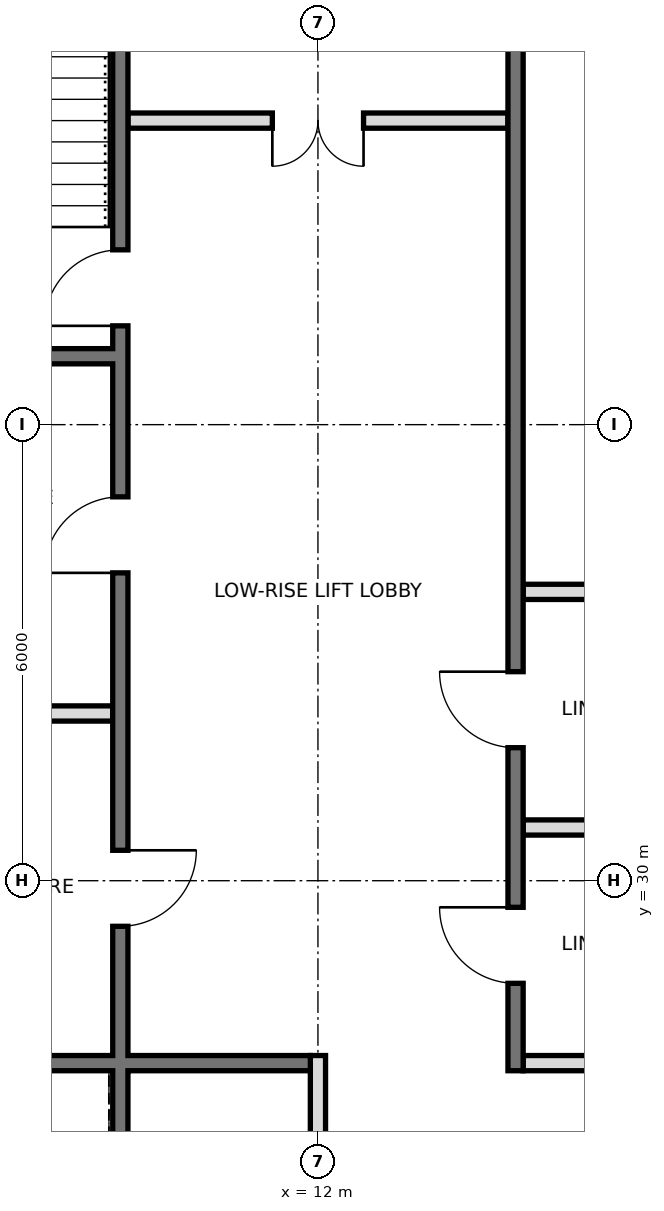
"""IFC4 building model, lengths in metres.
Left out: names, types, materials, properties, quantities, classifications, styles, units other than length and angle.
Written with IfcOpenShell. Run it as: python <this file> out.ifc"""

import sys

from ifc_helpers import new_model, si_unit, direction, frame, frame_2d, origin, place, context, subcontext, project, spatial, rectangle, extrude, element, fill, save


model = new_model("IFC4")
c1 = context("Model", 3, precision=1e-05, world=origin(), true_north=direction((0.0, 1.0)))
c2 = subcontext(c1, "Body", "Model", "MODEL_VIEW")
j1 = project(units=[si_unit("LENGTHUNIT", "METRE"), si_unit("PLANEANGLEUNIT", "RADIAN")], contexts=[c1])
p1 = place(None, origin())
s1 = spatial("IfcSite", under=j1, at=p1, CompositionType="ELEMENT")
p2 = place(p1, origin())
s2 = spatial("IfcBuilding", under=s1, at=p2, CompositionType="ELEMENT")
p3 = place(p2, frame((0.0, 0.0, 349.8)))
s3 = spatial("IfcBuildingStorey", under=s2, at=p3, CompositionType="ELEMENT", Elevation=349.8)
p4 = place(p3, frame((12.0, 21.5, 0.0), z_axis=(0.0, 0.0, 1.0), x_axis=(0.0, 1.0, 0.0)))
e1 = element("IfcWall", 1, at=p4, inside=s3, PredefinedType="PARTITIONING", context=c2, shape_type="SweptSolid", body=[
    extrude(rectangle(XDim=6.2, YDim=0.2, at=frame_2d((3.1, 0.0))), origin(), (0.0, 0.0, 1.0), 3.75),
])
p5 = place(p3, frame((14.6, 27.5, 0.0), z_axis=(0.0, 0.0, 1.0), x_axis=(0.0, 1.0, 0.0)))
e2 = element("IfcWall", 2, at=p5, inside=s3, PredefinedType="SOLIDWALL", context=c2, shape_type="SweptSolid", body=[
    extrude(rectangle(XDim=17.5, YDim=0.2, at=frame_2d((8.75, 0.0))), origin(), (0.0, 0.0, 1.0), 3.75),
])
p6 = place(p5, frame((15.4, 0.0, 0.0)))
e3 = element("IfcOpeningElement", 3, at=p6, cuts=e2, PredefinedType="OPENING", context=c2, shape_type="SweptSolid", body=[
    extrude(rectangle(XDim=1.1, YDim=2.1, at=frame_2d((0.55, 1.05))), frame((0.0, 0.11, 0.0), z_axis=(0.0, -1.0, 0.0), x_axis=(1.0, 0.0, 0.0)), (0.0, 0.0, 1.0), 0.22),
])
p7 = place(p5, frame((1.15, 0.0, 0.0)))
e4 = element("IfcOpeningElement", 4, at=p7, cuts=e2, PredefinedType="OPENING", context=c2, shape_type="SweptSolid", body=[
    extrude(rectangle(XDim=1.0, YDim=2.1, at=frame_2d((0.5, 1.05))), frame((0.0, 0.11, 0.0), z_axis=(0.0, -1.0, 0.0), x_axis=(1.0, 0.0, 0.0)), (0.0, 0.0, 1.0), 0.22),
])
p8 = place(p5, frame((4.25, 0.0, 0.0)))
e5 = element("IfcOpeningElement", 5, at=p8, cuts=e2, PredefinedType="OPENING", context=c2, shape_type="SweptSolid", body=[
    extrude(rectangle(XDim=1.0, YDim=2.1, at=frame_2d((0.5, 1.05))), frame((0.0, 0.11, 0.0), z_axis=(0.0, -1.0, 0.0), x_axis=(1.0, 0.0, 0.0)), (0.0, 0.0, 1.0), 0.22),
])
p9 = place(p3, frame((9.4, 21.5, 0.0), z_axis=(0.0, 0.0, 1.0), x_axis=(0.0, 1.0, 0.0)))
e6 = element("IfcWall", 6, at=p9, inside=s3, PredefinedType="SOLIDWALL", context=c2, shape_type="SweptSolid", body=[
    extrude(rectangle(XDim=23.5, YDim=0.2, at=frame_2d((11.75, 0.0))), origin(), (0.0, 0.0, 1.0), 3.75),
])
p10 = place(p9, frame((7.9, 0.0, 0.0)))
e7 = element("IfcOpeningElement", 7, at=p10, cuts=e6, PredefinedType="OPENING", context=c2, shape_type="SweptSolid", body=[
    extrude(rectangle(XDim=1.0, YDim=2.1, at=frame_2d((0.5, 1.05))), frame((0.0, 0.11, 0.0), z_axis=(0.0, -1.0, 0.0), x_axis=(1.0, 0.0, 0.0)), (0.0, 0.0, 1.0), 0.22),
])
p11 = place(p9, frame((12.55, 0.0, 0.0)))
e8 = element("IfcOpeningElement", 8, at=p11, cuts=e6, PredefinedType="OPENING", context=c2, shape_type="SweptSolid", body=[
    extrude(rectangle(XDim=1.0, YDim=2.1, at=frame_2d((0.5, 1.05))), frame((0.0, 0.11, 0.0), z_axis=(0.0, -1.0, 0.0), x_axis=(1.0, 0.0, 0.0)), (0.0, 0.0, 1.0), 0.22),
])
p12 = place(p9, frame((15.8, 0.0, 0.0)))
e9 = element("IfcOpeningElement", 9, at=p12, cuts=e6, PredefinedType="OPENING", context=c2, shape_type="SweptSolid", body=[
    extrude(rectangle(XDim=1.0, YDim=2.1, at=frame_2d((0.5, 1.05))), frame((0.0, 0.11, 0.0), z_axis=(0.0, -1.0, 0.0), x_axis=(1.0, 0.0, 0.0)), (0.0, 0.0, 1.0), 0.22),
])
p13 = place(p9, frame((0.275, 0.0, 0.0)))
e10 = element("IfcOpeningElement", 10, at=p13, cuts=e6, PredefinedType="OPENING", context=c2, shape_type="SweptSolid", body=[
    extrude(rectangle(XDim=0.9, YDim=2.1, at=frame_2d((0.45, 1.05))), frame((0.0, 0.11, 0.0), z_axis=(0.0, -1.0, 0.0), x_axis=(1.0, 0.0, 0.0)), (0.0, 0.0, 1.0), 0.22),
])
p14 = place(p3, frame((14.7, 27.6, 0.0), z_axis=(0.0, 0.0, 1.0), x_axis=(1.0, 0.0, 0.0)))
e11 = element("IfcWall", 11, at=p14, inside=s3, PredefinedType="PARTITIONING", context=c2, shape_type="SweptSolid", body=[
    extrude(rectangle(XDim=2.7, YDim=0.2, at=frame_2d((1.35, 0.0))), origin(), (0.0, 0.0, 1.0), 3.75),
])
p15 = place(p3, frame((6.6, 27.6, 0.0), z_axis=(0.0, 0.0, 1.0), x_axis=(1.0, 0.0, 0.0)))
e12 = element("IfcWall", 12, at=p15, inside=s3, PredefinedType="SOLIDWALL", context=c2, shape_type="SweptSolid", body=[
    extrude(rectangle(XDim=5.3, YDim=0.2, at=frame_2d((2.65, 0.0))), origin(), (0.0, 0.0, 1.0), 3.75),
])
for number, where, z_axis, x_axis in (
    (13, (14.7, 30.7, 0.0), (0.0, 0.0, 1.0), (1.0, 0.0, 0.0)),
    (14, (6.6, 32.2, 0.0), (0.0, 0.0, 1.0), (1.0, 0.0, 0.0)),
    (15, (14.7, 33.8, 0.0), (0.0, 0.0, 1.0), (1.0, 0.0, 0.0)),
):
    element("IfcWall", number, at=place(p3, frame(where, z_axis=z_axis, x_axis=x_axis)), inside=s3, PredefinedType="PARTITIONING", context=c2, shape_type="SweptSolid", body=[
        extrude(rectangle(XDim=2.7, YDim=0.2, at=frame_2d((1.35, 0.0))), origin(), (0.0, 0.0, 1.0), 3.75),
    ])
p16 = place(p3, frame((6.6, 36.9, 0.0), z_axis=(0.0, 0.0, 1.0), x_axis=(1.0, 0.0, 0.0)))
e16 = element("IfcWall", 16, at=p16, inside=s3, PredefinedType="SOLIDWALL", context=c2, shape_type="SweptSolid", body=[
    extrude(rectangle(XDim=2.7, YDim=0.2, at=frame_2d((1.35, 0.0))), origin(), (0.0, 0.0, 1.0), 3.75),
])
p17 = place(p3, frame((9.5, 40.0, 0.0), z_axis=(0.0, 0.0, 1.0), x_axis=(1.0, 0.0, 0.0)))
e17 = element("IfcWall", 17, at=p17, inside=s3, PredefinedType="PARTITIONING", context=c2, shape_type="SweptSolid", body=[
    extrude(rectangle(XDim=5.0, YDim=0.2, at=frame_2d((2.5, 0.0))), origin(), (0.0, 0.0, 1.0), 3.75),
])
p18 = place(p17, frame((1.9, 0.0, 0.0)))
e18 = element("IfcOpeningElement", 18, at=p18, cuts=e17, PredefinedType="OPENING", context=c2, shape_type="SweptSolid", body=[
    extrude(rectangle(XDim=1.2, YDim=2.1, at=frame_2d((0.6, 1.05))), frame((0.0, 0.11, 0.0), z_axis=(0.0, -1.0, 0.0), x_axis=(1.0, 0.0, 0.0)), (0.0, 0.0, 1.0), 0.22),
])
p19 = place(p18, frame((1.2, 0.0, 0.0), z_axis=(0.0, 0.0, 1.0), x_axis=(-1.0, 0.0, 0.0)))
e19 = element("IfcDoor", 19, at=p19, inside=s3, OperationType="DOUBLE_DOOR_SINGLE_SWING", PredefinedType="DOOR", context=c2, shape_type="SweptSolid", body=[
    extrude(rectangle(XDim=1.2, YDim=2.1, at=frame_2d((0.6, 1.05))), frame((0.0, 0.025, 0.0), z_axis=(0.0, -1.0, 0.0), x_axis=(1.0, 0.0, 0.0)), (0.0, 0.0, 1.0), 0.05),
])
fill(e18, e19)
p20 = place(p7, frame((1.0, 0.0, 0.0), z_axis=(0.0, 0.0, 1.0), x_axis=(-1.0, 0.0, 0.0)))
e20 = element("IfcDoor", 20, at=p20, inside=s3, OperationType="SINGLE_SWING_LEFT", PredefinedType="DOOR", context=c2, shape_type="SweptSolid", body=[
    extrude(rectangle(XDim=1.0, YDim=2.1, at=frame_2d((0.5, 1.05))), frame((0.0, 0.025, 0.0), z_axis=(0.0, -1.0, 0.0), x_axis=(1.0, 0.0, 0.0)), (0.0, 0.0, 1.0), 0.05),
])
fill(e4, e20)
p21 = place(p8, frame((1.0, 0.0, 0.0), z_axis=(0.0, 0.0, 1.0), x_axis=(-1.0, 0.0, 0.0)))
e21 = element("IfcDoor", 21, at=p21, inside=s3, OperationType="SINGLE_SWING_LEFT", PredefinedType="DOOR", context=c2, shape_type="SweptSolid", body=[
    extrude(rectangle(XDim=1.0, YDim=2.1, at=frame_2d((0.5, 1.05))), frame((0.0, 0.025, 0.0), z_axis=(0.0, -1.0, 0.0), x_axis=(1.0, 0.0, 0.0)), (0.0, 0.0, 1.0), 0.05),
])
fill(e5, e21)
p22 = place(p10, origin())
e22 = element("IfcDoor", 22, at=p22, inside=s3, OperationType="SINGLE_SWING_RIGHT", PredefinedType="DOOR", context=c2, shape_type="SweptSolid", body=[
    extrude(rectangle(XDim=1.0, YDim=2.1, at=frame_2d((0.5, 1.05))), frame((0.0, 0.025, 0.0), z_axis=(0.0, -1.0, 0.0), x_axis=(1.0, 0.0, 0.0)), (0.0, 0.0, 1.0), 0.05),
])
fill(e7, e22)
p23 = place(p11, origin())
e23 = element("IfcDoor", 23, at=p23, inside=s3, OperationType="SINGLE_SWING_LEFT", PredefinedType="DOOR", context=c2, shape_type="SweptSolid", body=[
    extrude(rectangle(XDim=1.0, YDim=2.1, at=frame_2d((0.5, 1.05))), frame((0.0, 0.025, 0.0), z_axis=(0.0, -1.0, 0.0), x_axis=(1.0, 0.0, 0.0)), (0.0, 0.0, 1.0), 0.05),
])
fill(e8, e23)
p24 = place(p12, origin())
e24 = element("IfcDoor", 24, at=p24, inside=s3, OperationType="SINGLE_SWING_LEFT", PredefinedType="DOOR", context=c2, shape_type="SweptSolid", body=[
    extrude(rectangle(XDim=1.0, YDim=2.1, at=frame_2d((0.5, 1.05))), frame((0.0, 0.025, 0.0), z_axis=(0.0, -1.0, 0.0), x_axis=(1.0, 0.0, 0.0)), (0.0, 0.0, 1.0), 0.05),
])
fill(e9, e24)
save(model, sys.argv[1])
